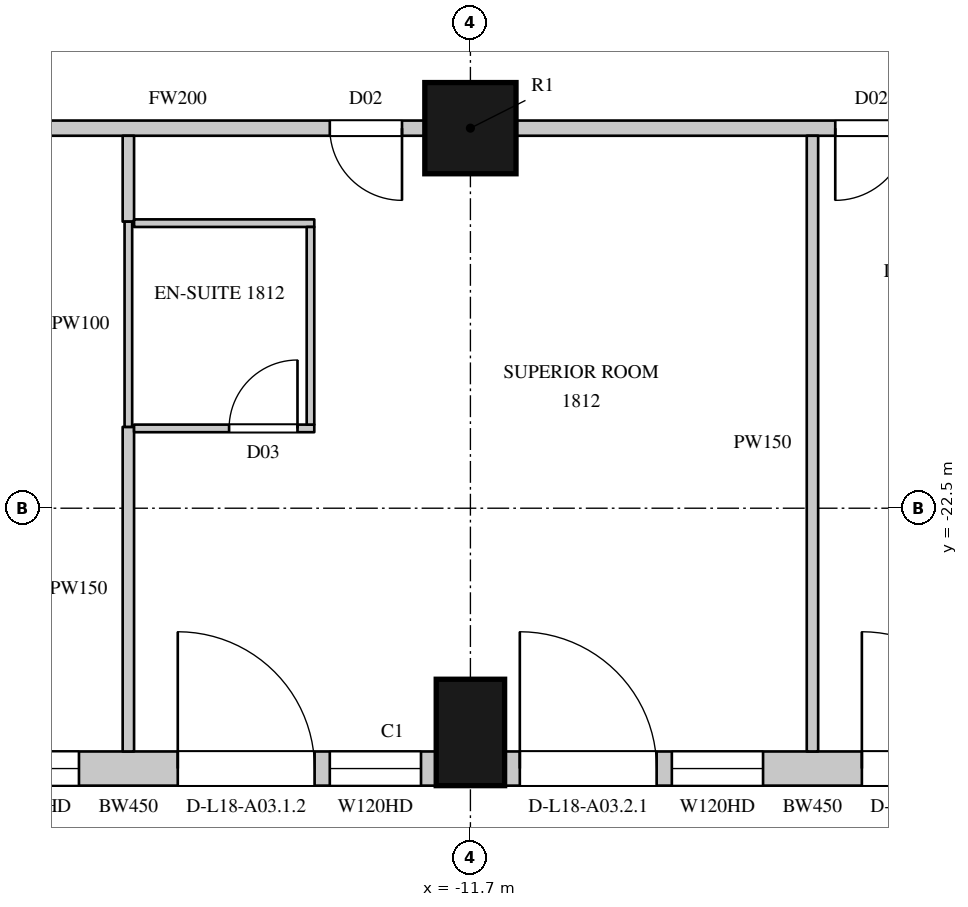
"""IFC4 building model, lengths in metres.
Left out: names, types, materials, properties, quantities, classifications, styles, units other than length and angle.
Written with IfcOpenShell. Run it as: python <this file> out.ifc"""

import sys

from ifc_helpers import new_model, si_unit, direction, frame, frame_2d, origin, origin_2d, place, context, subcontext, project, spatial, rectangle, circle, extrude, element, fill, save


model = new_model("IFC4")
c1 = context("Model", 3, precision=1e-05, world=origin(), true_north=direction((0.0, 1.0)))
c2 = subcontext(c1, "Body", "Model", "MODEL_VIEW")
j1 = project(units=[si_unit("LENGTHUNIT", "METRE"), si_unit("PLANEANGLEUNIT", "RADIAN")], contexts=[c1])
p1 = place(None, origin())
s1 = spatial("IfcSite", under=j1, at=p1, CompositionType="ELEMENT")
p2 = place(p1, origin())
s2 = spatial("IfcBuilding", under=s1, at=p2, CompositionType="ELEMENT")
p3 = place(p2, frame((0.0, 0.0, 95.1)))
s3 = spatial("IfcBuildingStorey", under=s2, at=p3, CompositionType="ELEMENT", Elevation=95.1)
p4 = place(p3, frame((-11.7, -25.45, 0.0), z_axis=(0.0, 0.0, 1.0), x_axis=(1.0, 0.0, 0.0)))
e1 = element("IfcColumn", 1, at=p4, inside=s3, PredefinedType="COLUMN", context=c2, shape_type="SweptSolid", body=[
    extrude(rectangle(XDim=0.9, YDim=1.4, at=origin_2d()), origin(), (0.0, 0.0, 1.0), 3.6),
])
p5 = place(p3, frame((-11.7, -17.5, 0.0), z_axis=(0.0, 0.0, 1.0), x_axis=(1.0, 0.0, 0.0)))
e2 = element("IfcColumn", 2, at=p5, inside=s3, PredefinedType="COLUMN", context=c2, shape_type="SweptSolid", body=[
    extrude(circle(Radius=0.6, at=origin_2d()), origin(), (0.0, 0.0, 1.0), 3.6),
])
p6 = place(p3, frame((-20.25, -25.925, 0.0), z_axis=(0.0, 0.0, 1.0), x_axis=(1.0, 0.0, 0.0)))
e3 = element("IfcWall", 3, at=p6, inside=s3, PredefinedType="SOLIDWALL", context=c2, shape_type="SweptSolid", body=[
    extrude(rectangle(XDim=8.1, YDim=0.45, at=frame_2d((4.05, 0.0))), origin(), (0.0, 0.0, 1.0), 3.3),
])
p7 = place(p6, frame((0.2, 0.0, 0.0)))
e4 = element("IfcOpeningElement", 4, at=p7, cuts=e3, PredefinedType="OPENING", context=c2, shape_type="SweptSolid", body=[
    extrude(rectangle(XDim=1.8, YDim=2.4, at=frame_2d((0.9, 1.2))), frame((0.0, 0.235, 0.0), z_axis=(0.0, -1.0, 0.0), x_axis=(1.0, 0.0, 0.0)), (0.0, 0.0, 1.0), 0.47),
])
p8 = place(p6, frame((2.2, 0.0, 1.05)))
e5 = element("IfcOpeningElement", 5, at=p8, cuts=e3, PredefinedType="OPENING", context=c2, shape_type="SweptSolid", body=[
    extrude(rectangle(XDim=1.2, YDim=2.0, at=frame_2d((0.6, 1.0))), frame((0.0, 0.235, 0.0), z_axis=(0.0, -1.0, 0.0), x_axis=(1.0, 0.0, 0.0)), (0.0, 0.0, 1.0), 0.47),
])
p9 = place(p6, frame((4.7, 0.0, 0.0)))
e6 = element("IfcOpeningElement", 6, at=p9, cuts=e3, PredefinedType="OPENING", context=c2, shape_type="SweptSolid", body=[
    extrude(rectangle(XDim=1.8, YDim=2.4, at=frame_2d((0.9, 1.2))), frame((0.0, 0.235, 0.0), z_axis=(0.0, -1.0, 0.0), x_axis=(1.0, 0.0, 0.0)), (0.0, 0.0, 1.0), 0.47),
])
p10 = place(p6, frame((6.7, 0.0, 1.05)))
e7 = element("IfcOpeningElement", 7, at=p10, cuts=e3, PredefinedType="OPENING", context=c2, shape_type="SweptSolid", body=[
    extrude(rectangle(XDim=1.2, YDim=2.0, at=frame_2d((0.6, 1.0))), frame((0.0, 0.235, 0.0), z_axis=(0.0, -1.0, 0.0), x_axis=(1.0, 0.0, 0.0)), (0.0, 0.0, 1.0), 0.47),
])
p11 = place(p3, frame((-11.25, -25.925, 0.0), z_axis=(0.0, 0.0, 1.0), x_axis=(1.0, 0.0, 0.0)))
e8 = element("IfcWall", 8, at=p11, inside=s3, PredefinedType="SOLIDWALL", context=c2, shape_type="SweptSolid", body=[
    extrude(rectangle(XDim=8.1, YDim=0.45, at=frame_2d((4.05, 0.0))), origin(), (0.0, 0.0, 1.0), 3.3),
])
p12 = place(p11, frame((0.2, 0.0, 0.0)))
e9 = element("IfcOpeningElement", 9, at=p12, cuts=e8, PredefinedType="OPENING", context=c2, shape_type="SweptSolid", body=[
    extrude(rectangle(XDim=1.8, YDim=2.4, at=frame_2d((0.9, 1.2))), frame((0.0, 0.235, 0.0), z_axis=(0.0, -1.0, 0.0), x_axis=(1.0, 0.0, 0.0)), (0.0, 0.0, 1.0), 0.47),
])
p13 = place(p11, frame((2.2, 0.0, 1.05)))
e10 = element("IfcOpeningElement", 10, at=p13, cuts=e8, PredefinedType="OPENING", context=c2, shape_type="SweptSolid", body=[
    extrude(rectangle(XDim=1.2, YDim=2.0, at=frame_2d((0.6, 1.0))), frame((0.0, 0.235, 0.0), z_axis=(0.0, -1.0, 0.0), x_axis=(1.0, 0.0, 0.0)), (0.0, 0.0, 1.0), 0.47),
])
p14 = place(p11, frame((4.7, 0.0, 0.0)))
e11 = element("IfcOpeningElement", 11, at=p14, cuts=e8, PredefinedType="OPENING", context=c2, shape_type="SweptSolid", body=[
    extrude(rectangle(XDim=1.8, YDim=2.4, at=frame_2d((0.9, 1.2))), frame((0.0, 0.235, 0.0), z_axis=(0.0, -1.0, 0.0), x_axis=(1.0, 0.0, 0.0)), (0.0, 0.0, 1.0), 0.47),
])
p15 = place(p11, frame((6.7, 0.0, 1.05)))
e12 = element("IfcOpeningElement", 12, at=p15, cuts=e8, PredefinedType="OPENING", context=c2, shape_type="SweptSolid", body=[
    extrude(rectangle(XDim=1.2, YDim=2.0, at=frame_2d((0.6, 1.0))), frame((0.0, 0.235, 0.0), z_axis=(0.0, -1.0, 0.0), x_axis=(1.0, 0.0, 0.0)), (0.0, 0.0, 1.0), 0.47),
])
p16 = place(p3, frame((-18.8, -17.5, 0.0), z_axis=(0.0, 0.0, 1.0), x_axis=(1.0, 0.0, 0.0)))
e13 = element("IfcWall", 13, at=p16, inside=s3, PredefinedType="PARTITIONING", context=c2, shape_type="SweptSolid", body=[
    extrude(rectangle(XDim=6.5, YDim=0.2, at=frame_2d((3.25, 0.0))), origin(), (0.0, 0.0, 1.0), 2.75),
])
p17 = place(p16, frame((5.25, 0.0, 0.0)))
e14 = element("IfcOpeningElement", 14, at=p17, cuts=e13, PredefinedType="OPENING", context=c2, shape_type="SweptSolid", body=[
    extrude(rectangle(XDim=0.95, YDim=2.2, at=frame_2d((0.475, 1.1))), frame((0.0, 0.11, 0.0), z_axis=(0.0, -1.0, 0.0), x_axis=(1.0, 0.0, 0.0)), (0.0, 0.0, 1.0), 0.22),
])
p18 = place(p3, frame((-11.1, -17.5, 0.0), z_axis=(0.0, 0.0, 1.0), x_axis=(1.0, 0.0, 0.0)))
e15 = element("IfcWall", 15, at=p18, inside=s3, PredefinedType="PARTITIONING", context=c2, shape_type="SweptSolid", body=[
    extrude(rectangle(XDim=7.8, YDim=0.2, at=frame_2d((3.9, 0.0))), origin(), (0.0, 0.0, 1.0), 2.75),
])
p19 = place(p18, frame((4.2, 0.0, 0.0)))
e16 = element("IfcOpeningElement", 16, at=p19, cuts=e15, PredefinedType="OPENING", context=c2, shape_type="SweptSolid", body=[
    extrude(rectangle(XDim=0.95, YDim=2.2, at=frame_2d((0.475, 1.1))), frame((0.0, 0.11, 0.0), z_axis=(0.0, -1.0, 0.0), x_axis=(1.0, 0.0, 0.0)), (0.0, 0.0, 1.0), 0.22),
])
p20 = place(p3, frame((-16.2, -25.7, 0.0), z_axis=(0.0, 0.0, 1.0), x_axis=(0.0, 1.0, 0.0)))
e17 = element("IfcWall", 17, at=p20, inside=s3, PredefinedType="PARTITIONING", context=c2, shape_type="SweptSolid", body=[
    extrude(rectangle(XDim=4.27, YDim=0.15, at=frame_2d((2.135, 0.0))), origin(), (0.0, 0.0, 1.0), 2.65),
])
p21 = place(p3, frame((-16.2, -18.73, 0.0), z_axis=(0.0, 0.0, 1.0), x_axis=(0.0, 1.0, 0.0)))
e18 = element("IfcWall", 18, at=p21, inside=s3, PredefinedType="PARTITIONING", context=c2, shape_type="SweptSolid", body=[
    extrude(rectangle(XDim=1.13, YDim=0.15, at=frame_2d((0.565, 0.0))), origin(), (0.0, 0.0, 1.0), 2.65),
])
p22 = place(p3, frame((-7.2, -25.7, 0.0), z_axis=(0.0, 0.0, 1.0), x_axis=(0.0, 1.0, 0.0)))
e19 = element("IfcWall", 19, at=p22, inside=s3, PredefinedType="PARTITIONING", context=c2, shape_type="SweptSolid", body=[
    extrude(rectangle(XDim=8.1, YDim=0.15, at=frame_2d((4.05, 0.0))), origin(), (0.0, 0.0, 1.0), 2.65),
])
p23 = place(p3, frame((-16.2, -21.43, 0.0), z_axis=(0.0, 0.0, 1.0), x_axis=(0.0, 1.0, 0.0)))
e20 = element("IfcWall", 20, at=p23, inside=s3, PredefinedType="PARTITIONING", context=c2, shape_type="SweptSolid", body=[
    extrude(rectangle(XDim=2.7, YDim=0.1, at=frame_2d((1.35, 0.0))), origin(), (0.0, 0.0, 1.0), 2.65),
])
p24 = place(p3, frame((-16.125, -21.45, 0.0), z_axis=(0.0, 0.0, 1.0), x_axis=(1.0, 0.0, 0.0)))
e21 = element("IfcWall", 21, at=p24, inside=s3, PredefinedType="PARTITIONING", context=c2, shape_type="SweptSolid", body=[
    extrude(rectangle(XDim=2.371, YDim=0.1, at=frame_2d((1.186, 0.0))), origin(), (0.0, 0.0, 1.0), 3.3),
])
p25 = place(p24, frame((1.25, 0.0, 0.0)))
e22 = element("IfcOpeningElement", 22, at=p25, cuts=e21, PredefinedType="OPENING", context=c2, shape_type="SweptSolid", body=[
    extrude(rectangle(XDim=0.9, YDim=2.2, at=frame_2d((0.45, 1.1))), frame((0.0, 0.06, 0.0), z_axis=(0.0, -1.0, 0.0), x_axis=(1.0, 0.0, 0.0)), (0.0, 0.0, 1.0), 0.12),
])
p26 = place(p3, frame((-16.125, -18.75, 0.0), z_axis=(0.0, 0.0, 1.0), x_axis=(1.0, 0.0, 0.0)))
e23 = element("IfcWall", 23, at=p26, inside=s3, PredefinedType="PARTITIONING", context=c2, shape_type="SweptSolid", body=[
    extrude(rectangle(XDim=2.371, YDim=0.1, at=frame_2d((1.186, 0.0))), origin(), (0.0, 0.0, 1.0), 3.3),
])
p27 = place(p3, frame((-13.804, -21.4, 0.0), z_axis=(0.0, 0.0, 1.0), x_axis=(0.0, 1.0, 0.0)))
e24 = element("IfcWall", 24, at=p27, inside=s3, PredefinedType="PARTITIONING", context=c2, shape_type="SweptSolid", body=[
    extrude(rectangle(XDim=2.6, YDim=0.1, at=frame_2d((1.3, 0.0))), origin(), (0.0, 0.0, 1.0), 3.3),
])
p28 = place(p8, origin())
e25 = element("IfcWindow", 25, at=p28, inside=s3, PartitioningType="SINGLE_PANEL", PredefinedType="WINDOW", context=c2, shape_type="SweptSolid", body=[
    extrude(rectangle(XDim=1.2, YDim=2.0, at=frame_2d((0.6, 1.0))), frame((0.0, 0.135, 0.0), z_axis=(0.0, -1.0, 0.0), x_axis=(1.0, 0.0, 0.0)), (0.0, 0.0, 1.0), 0.06),
])
fill(e5, e25)
p29 = place(p9, origin())
e26 = element("IfcDoor", 26, at=p29, inside=s3, OperationType="SLIDING_TO_LEFT", PredefinedType="DOOR", context=c2, shape_type="SweptSolid", body=[
    extrude(rectangle(XDim=1.8, YDim=2.4, at=frame_2d((0.9, 1.2))), frame((0.0, 0.13, 0.0), z_axis=(0.0, -1.0, 0.0), x_axis=(1.0, 0.0, 0.0)), (0.0, 0.0, 1.0), 0.05),
])
fill(e6, e26)
p30 = place(p10, origin())
e27 = element("IfcWindow", 27, at=p30, inside=s3, PartitioningType="SINGLE_PANEL", PredefinedType="WINDOW", context=c2, shape_type="SweptSolid", body=[
    extrude(rectangle(XDim=1.2, YDim=2.0, at=frame_2d((0.6, 1.0))), frame((0.0, 0.135, 0.0), z_axis=(0.0, -1.0, 0.0), x_axis=(1.0, 0.0, 0.0)), (0.0, 0.0, 1.0), 0.06),
])
fill(e7, e27)
p31 = place(p12, origin())
e28 = element("IfcDoor", 28, at=p31, inside=s3, OperationType="SLIDING_TO_LEFT", PredefinedType="DOOR", context=c2, shape_type="SweptSolid", body=[
    extrude(rectangle(XDim=1.8, YDim=2.4, at=frame_2d((0.9, 1.2))), frame((0.0, 0.13, 0.0), z_axis=(0.0, -1.0, 0.0), x_axis=(1.0, 0.0, 0.0)), (0.0, 0.0, 1.0), 0.05),
])
fill(e9, e28)
p32 = place(p13, origin())
e29 = element("IfcWindow", 29, at=p32, inside=s3, PartitioningType="SINGLE_PANEL", PredefinedType="WINDOW", context=c2, shape_type="SweptSolid", body=[
    extrude(rectangle(XDim=1.2, YDim=2.0, at=frame_2d((0.6, 1.0))), frame((0.0, 0.135, 0.0), z_axis=(0.0, -1.0, 0.0), x_axis=(1.0, 0.0, 0.0)), (0.0, 0.0, 1.0), 0.06),
])
fill(e10, e29)
p33 = place(p14, origin())
e30 = element("IfcDoor", 30, at=p33, inside=s3, OperationType="SLIDING_TO_LEFT", PredefinedType="DOOR", context=c2, shape_type="SweptSolid", body=[
    extrude(rectangle(XDim=1.8, YDim=2.4, at=frame_2d((0.9, 1.2))), frame((0.0, 0.13, 0.0), z_axis=(0.0, -1.0, 0.0), x_axis=(1.0, 0.0, 0.0)), (0.0, 0.0, 1.0), 0.05),
])
fill(e11, e30)
p34 = place(p17, origin())
e31 = element("IfcDoor", 31, at=p34, inside=s3, OperationType="SINGLE_SWING_LEFT", PredefinedType="DOOR", context=c2, shape_type="SweptSolid", body=[
    extrude(rectangle(XDim=0.95, YDim=2.2, at=frame_2d((0.475, 1.1))), frame((0.0, 0.025, 0.0), z_axis=(0.0, -1.0, 0.0), x_axis=(1.0, 0.0, 0.0)), (0.0, 0.0, 1.0), 0.05),
])
fill(e14, e31)
p35 = place(p25, origin())
e32 = element("IfcDoor", 32, at=p35, inside=s3, OperationType="SINGLE_SWING_RIGHT", PredefinedType="DOOR", context=c2, shape_type="SweptSolid", body=[
    extrude(rectangle(XDim=0.9, YDim=2.2, at=frame_2d((0.45, 1.1))), frame((0.0, 0.025, 0.0), z_axis=(0.0, -1.0, 0.0), x_axis=(1.0, 0.0, 0.0)), (0.0, 0.0, 1.0), 0.05),
])
fill(e22, e32)
p36 = place(p19, origin())
e33 = element("IfcDoor", 33, at=p36, inside=s3, OperationType="SINGLE_SWING_RIGHT", PredefinedType="DOOR", context=c2, shape_type="SweptSolid", body=[
    extrude(rectangle(XDim=0.95, YDim=2.2, at=frame_2d((0.475, 1.1))), frame((0.0, 0.025, 0.0), z_axis=(0.0, -1.0, 0.0), x_axis=(1.0, 0.0, 0.0)), (0.0, 0.0, 1.0), 0.05),
])
fill(e16, e33)
save(model, sys.argv[1])
